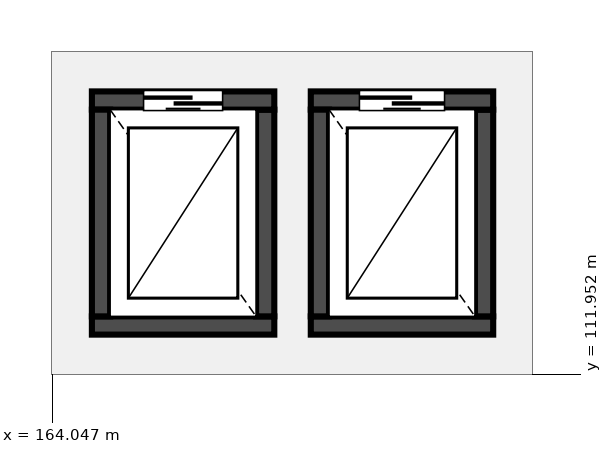
"""IFC4 building model, lengths in metres.
Left out: names, types, materials, properties, quantities, classifications, styles, units other than length and angle.
Written with IfcOpenShell. Run it as: python <this file> out.ifc"""

import sys

from ifc_helpers import new_model, si_unit, direction, frame, frame_2d, origin, place, context, subcontext, project, spatial, rectangle, extrude, element, fill, save


model = new_model("IFC4")
c1 = context("Model", 3, precision=1e-05, world=origin(), true_north=direction((0.0, 1.0)))
c2 = subcontext(c1, "Body", "Model", "MODEL_VIEW")
j1 = project(units=[si_unit("LENGTHUNIT", "METRE"), si_unit("PLANEANGLEUNIT", "RADIAN")], contexts=[c1])
p1 = place(None, origin())
s1 = spatial("IfcSite", under=j1, at=p1, CompositionType="ELEMENT")
p2 = place(p1, origin())
s2 = spatial("IfcBuilding", under=s1, at=p2, CompositionType="ELEMENT")
p3 = place(p2, frame((0.0, 0.0, 5.1)))
s3 = spatial("IfcBuildingStorey", under=s2, at=p3, CompositionType="ELEMENT", Elevation=5.1)
p4 = place(p3, frame((164.7, 112.75, 0.0), z_axis=(0.0, 0.0, 1.0), x_axis=(1.0, 0.0, 0.0)))
e1 = element("IfcWall", 1, at=p4, inside=s3, PredefinedType="SHEAR", context=c2, shape_type="SweptSolid", body=[
    extrude(rectangle(XDim=3.0, YDim=0.3, at=frame_2d((1.5, 0.0))), origin(), (0.0, 0.0, 1.0), 4.8),
])
p5 = place(p3, frame((167.55, 112.9, 0.0), z_axis=(0.0, 0.0, 1.0), x_axis=(0.0, 1.0, 0.0)))
e2 = element("IfcWall", 2, at=p5, inside=s3, PredefinedType="SHEAR", context=c2, shape_type="SweptSolid", body=[
    extrude(rectangle(XDim=3.4, YDim=0.3, at=frame_2d((1.7, 0.0))), origin(), (0.0, 0.0, 1.0), 4.8),
])
p6 = place(p3, frame((167.7, 116.45, 0.0), z_axis=(0.0, 0.0, 1.0), x_axis=(-1.0, 0.0, 0.0)))
e3 = element("IfcWall", 3, at=p6, inside=s3, PredefinedType="SHEAR", context=c2, shape_type="SweptSolid", body=[
    extrude(rectangle(XDim=3.0, YDim=0.3, at=frame_2d((1.5, 0.0))), origin(), (0.0, 0.0, 1.0), 4.8),
])
p7 = place(p6, frame((0.85, 0.0, 0.0)))
e4 = element("IfcOpeningElement", 4, at=p7, cuts=e3, PredefinedType="OPENING", context=c2, shape_type="SweptSolid", body=[
    extrude(rectangle(XDim=1.3, YDim=2.3, at=frame_2d((0.65, 1.15))), frame((0.0, 0.16, 0.0), z_axis=(0.0, -1.0, 0.0), x_axis=(1.0, 0.0, 0.0)), (0.0, 0.0, 1.0), 0.32),
])
p8 = place(p3, frame((164.85, 116.3, 0.0), z_axis=(0.0, 0.0, 1.0), x_axis=(0.0, -1.0, 0.0)))
e5 = element("IfcWall", 5, at=p8, inside=s3, PredefinedType="SHEAR", context=c2, shape_type="SweptSolid", body=[
    extrude(rectangle(XDim=3.4, YDim=0.3, at=frame_2d((1.7, 0.0))), origin(), (0.0, 0.0, 1.0), 4.8),
])
p9 = place(p3, frame((168.3, 112.75, 0.0), z_axis=(0.0, 0.0, 1.0), x_axis=(1.0, 0.0, 0.0)))
e6 = element("IfcWall", 6, at=p9, inside=s3, PredefinedType="SHEAR", context=c2, shape_type="SweptSolid", body=[
    extrude(rectangle(XDim=3.0, YDim=0.3, at=frame_2d((1.5, 0.0))), origin(), (0.0, 0.0, 1.0), 4.8),
])
p10 = place(p3, frame((171.15, 112.9, 0.0), z_axis=(0.0, 0.0, 1.0), x_axis=(0.0, 1.0, 0.0)))
e7 = element("IfcWall", 7, at=p10, inside=s3, PredefinedType="SHEAR", context=c2, shape_type="SweptSolid", body=[
    extrude(rectangle(XDim=3.4, YDim=0.3, at=frame_2d((1.7, 0.0))), origin(), (0.0, 0.0, 1.0), 4.8),
])
p11 = place(p3, frame((171.3, 116.45, 0.0), z_axis=(0.0, 0.0, 1.0), x_axis=(-1.0, 0.0, 0.0)))
e8 = element("IfcWall", 8, at=p11, inside=s3, PredefinedType="SHEAR", context=c2, shape_type="SweptSolid", body=[
    extrude(rectangle(XDim=3.0, YDim=0.3, at=frame_2d((1.5, 0.0))), origin(), (0.0, 0.0, 1.0), 4.8),
])
p12 = place(p11, frame((0.8, 0.0, 0.0)))
e9 = element("IfcOpeningElement", 9, at=p12, cuts=e8, PredefinedType="OPENING", context=c2, shape_type="SweptSolid", body=[
    extrude(rectangle(XDim=1.4, YDim=2.3, at=frame_2d((0.7, 1.15))), frame((0.0, 0.16, 0.0), z_axis=(0.0, -1.0, 0.0), x_axis=(1.0, 0.0, 0.0)), (0.0, 0.0, 1.0), 0.32),
])
p13 = place(p3, frame((168.45, 116.3, 0.0), z_axis=(0.0, 0.0, 1.0), x_axis=(0.0, -1.0, 0.0)))
e10 = element("IfcWall", 10, at=p13, inside=s3, PredefinedType="SHEAR", context=c2, shape_type="SweptSolid", body=[
    extrude(rectangle(XDim=3.4, YDim=0.3, at=frame_2d((1.7, 0.0))), origin(), (0.0, 0.0, 1.0), 4.8),
])
p14 = place(p7, origin())
e11 = element("IfcDoor", 11, at=p14, inside=s3, OperationType="SLIDING_TO_RIGHT", PredefinedType="DOOR", context=c2, shape_type="SweptSolid", body=[
    extrude(rectangle(XDim=1.3, YDim=2.3, at=frame_2d((0.65, 1.15))), frame((0.0, 0.025, 0.0), z_axis=(0.0, -1.0, 0.0), x_axis=(1.0, 0.0, 0.0)), (0.0, 0.0, 1.0), 0.05),
])
fill(e4, e11)
p15 = place(p12, origin())
e12 = element("IfcDoor", 12, at=p15, inside=s3, OperationType="SLIDING_TO_LEFT", PredefinedType="DOOR", context=c2, shape_type="SweptSolid", body=[
    extrude(rectangle(XDim=1.4, YDim=2.3, at=frame_2d((0.7, 1.15))), frame((0.0, 0.025, 0.0), z_axis=(0.0, -1.0, 0.0), x_axis=(1.0, 0.0, 0.0)), (0.0, 0.0, 1.0), 0.05),
])
fill(e9, e12)
save(model, sys.argv[1])
